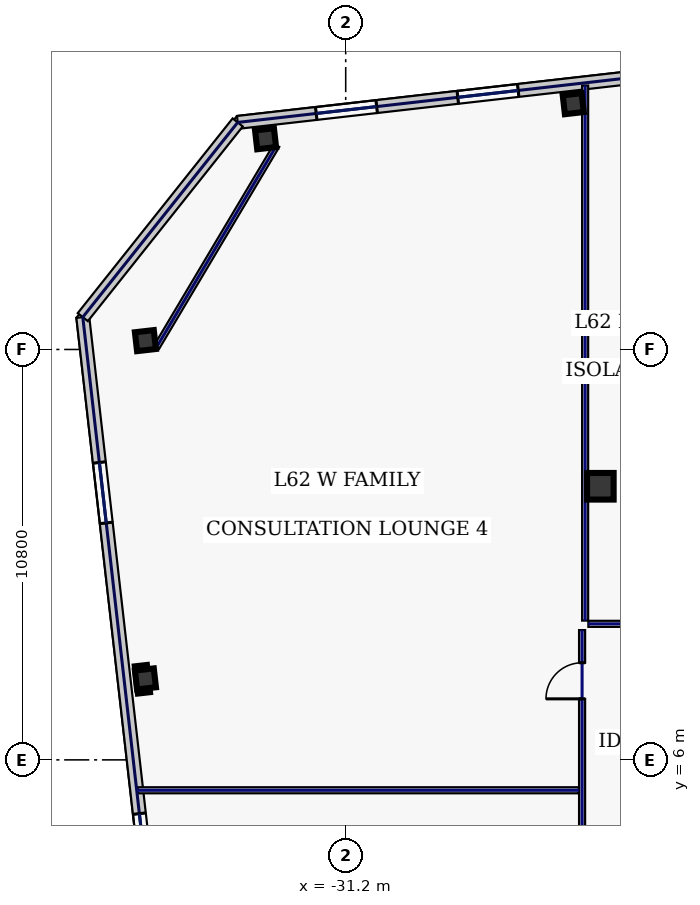
"""IFC4 building model, lengths in metres.
Left out: names, types, materials, properties, quantities, classifications, styles, units other than length and angle.
Written with IfcOpenShell. Run it as: python <this file> out.ifc"""

import sys

from ifc_helpers import new_model, si_unit, direction, frame, frame_2d, origin, origin_2d, place, context, subcontext, project, spatial, rectangle, hollow_rectangle, extrude, element, fill, save


model = new_model("IFC4")
c1 = context("Model", 3, precision=1e-05, world=origin(), true_north=direction((0.0, 1.0)))
c2 = subcontext(c1, "Body", "Model", "MODEL_VIEW")
j1 = project(units=[si_unit("LENGTHUNIT", "METRE"), si_unit("PLANEANGLEUNIT", "RADIAN")], contexts=[c1])
p1 = place(None, origin())
s1 = spatial("IfcSite", under=j1, at=p1, CompositionType="ELEMENT")
p2 = place(p1, origin())
s2 = spatial("IfcBuilding", under=s1, at=p2, CompositionType="ELEMENT")
p3 = place(p2, frame((0.0, 0.0, 267.0)))
s3 = spatial("IfcBuildingStorey", under=s2, at=p3, CompositionType="ELEMENT", Elevation=267.0)
p4 = place(p3, frame((-24.5, 13.2, 0.0), z_axis=(0.0, 0.0, 1.0), x_axis=(1.0, 0.0, 0.0)))
e1 = element("IfcColumn", 1, at=p4, inside=s3, PredefinedType="COLUMN", context=c2, shape_type="SweptSolid", body=[
    extrude(hollow_rectangle(XDim=0.7, YDim=0.7, WallThickness=0.032, at=origin_2d()), origin(), (0.0, 0.0, 1.0), 3.68),
])
for number, where, z_axis, x_axis in (
    (2, (-25.212, 23.268, 0.0), (0.0, 0.0, 1.0), (0.994, 0.113, 0.0)),
    (3, (-33.309, 22.345, 0.0), (0.0, 0.0, 1.0), (0.994, 0.113, 0.0)),
    (4, (-36.47, 17.033, 0.0), (0.0, 0.0, 1.0), (0.994, 0.113, 0.0)),
    (5, (-36.47, 8.131, 0.0), (0.0, 0.0, 1.0), (0.994, 0.113, 0.0)),
):
    element("IfcColumn", number, at=place(p3, frame(where, z_axis=z_axis, x_axis=x_axis)), inside=s3, PredefinedType="COLUMN", context=c2, shape_type="SweptSolid", body=[
        extrude(hollow_rectangle(XDim=0.5, YDim=0.5, WallThickness=0.025, at=origin_2d()), origin(), (0.0, 0.0, 1.0), 3.68),
    ])
p5 = place(p3, frame((-15.51, 24.886, 0.0), z_axis=(0.0, 0.0, 1.0), x_axis=(-0.993572271362, -0.113199565282, 0.0)))
e6 = element("IfcWall", 6, at=p5, inside=s3, PredefinedType="STANDARD", context=c2, shape_type="SweptSolid", body=[
    extrude(rectangle(XDim=18.651, YDim=0.34, at=frame_2d((9.326, 0.0))), origin(), (0.0, 0.0, 1.0), 3.68),
])
p6 = place(p5, frame((14.971, 0.0, 0.22)))
e7 = element("IfcOpeningElement", 7, at=p6, cuts=e6, PredefinedType="OPENING", context=c2, shape_type="SweptSolid", body=[
    extrude(rectangle(XDim=1.6, YDim=1.2, at=frame_2d((0.8, 0.6))), frame((0.0, 0.18, 0.0), z_axis=(0.0, -1.0, 0.0), x_axis=(1.0, 0.0, 0.0)), (0.0, 0.0, 1.0), 0.36),
])
p7 = place(p5, frame((11.223, 0.0, 0.22)))
e8 = element("IfcOpeningElement", 8, at=p7, cuts=e6, PredefinedType="OPENING", context=c2, shape_type="SweptSolid", body=[
    extrude(rectangle(XDim=1.6, YDim=1.2, at=frame_2d((0.8, 0.6))), frame((0.0, 0.18, 0.0), z_axis=(0.0, -1.0, 0.0), x_axis=(1.0, 0.0, 0.0)), (0.0, 0.0, 1.0), 0.36),
])
p8 = place(p5, frame((6.823, 0.0, 0.22)))
e9 = element("IfcOpeningElement", 9, at=p8, cuts=e6, PredefinedType="OPENING", context=c2, shape_type="SweptSolid", body=[
    extrude(rectangle(XDim=1.6, YDim=1.2, at=frame_2d((0.8, 0.6))), frame((0.0, 0.18, 0.0), z_axis=(0.0, -1.0, 0.0), x_axis=(1.0, 0.0, 0.0)), (0.0, 0.0, 1.0), 0.36),
])
p9 = place(p3, frame((-38.118, 17.651, 0.0), z_axis=(0.0, 0.0, 1.0), x_axis=(0.11320360501, -0.9935718111, 0.0)))
e10 = element("IfcWall", 10, at=p9, inside=s3, PredefinedType="STANDARD", context=c2, shape_type="SweptSolid", body=[
    extrude(rectangle(XDim=37.2, YDim=0.34, at=frame_2d((18.6, 0.0))), origin(), (0.0, 0.0, 1.0), 3.68),
])
p10 = place(p9, frame((3.85, 0.0, 0.22)))
e11 = element("IfcOpeningElement", 11, at=p10, cuts=e10, PredefinedType="OPENING", context=c2, shape_type="SweptSolid", body=[
    extrude(rectangle(XDim=1.6, YDim=1.2, at=frame_2d((0.8, 0.6))), frame((0.0, 0.18, 0.0), z_axis=(0.0, -1.0, 0.0), x_axis=(1.0, 0.0, 0.0)), (0.0, 0.0, 1.0), 0.36),
])
p11 = place(p9, frame((13.15, 0.0, 0.22)))
e12 = element("IfcOpeningElement", 12, at=p11, cuts=e10, PredefinedType="OPENING", context=c2, shape_type="SweptSolid", body=[
    extrude(rectangle(XDim=1.6, YDim=1.2, at=frame_2d((0.8, 0.6))), frame((0.0, 0.18, 0.0), z_axis=(0.0, -1.0, 0.0), x_axis=(1.0, 0.0, 0.0)), (0.0, 0.0, 1.0), 0.36),
])
p12 = place(p9, frame((31.75, 0.0, 0.22)))
e13 = element("IfcOpeningElement", 13, at=p12, cuts=e10, PredefinedType="OPENING", context=c2, shape_type="SweptSolid", body=[
    extrude(rectangle(XDim=1.6, YDim=1.2, at=frame_2d((0.8, 0.6))), frame((0.0, 0.18, 0.0), z_axis=(0.0, -1.0, 0.0), x_axis=(1.0, 0.0, 0.0)), (0.0, 0.0, 1.0), 0.36),
])
p13 = place(p3, frame((-34.042, 22.775, 0.0), z_axis=(0.0, 0.0, 1.0), x_axis=(-0.62252823689, -0.78259733853, 0.0)))
e14 = element("IfcWall", 14, at=p13, inside=s3, PredefinedType="STANDARD", context=c2, shape_type="SweptSolid", body=[
    extrude(rectangle(XDim=6.548, YDim=0.34, at=frame_2d((3.274, 0.0))), origin(), (0.0, 0.0, 1.0), 3.68),
])
p14 = place(p3, frame((-33.016, 22.171, 0.0), z_axis=(0.0, 0.0, 1.0), x_axis=(-0.511385266265, -0.859351563359, 0.0)))
e15 = element("IfcWall", 15, at=p14, inside=s3, PredefinedType="PARTITIONING", context=c2, shape_type="SweptSolid", body=[
    extrude(rectangle(XDim=6.182, YDim=0.16, at=frame_2d((3.091, 0.0))), origin(), (0.0, 0.0, 1.0), 1.475),
])
p15 = place(p3, frame((-24.98, -9.215, 0.0), z_axis=(0.0, 0.0, 1.0), x_axis=(0.0, 1.0, 0.0)))
e16 = element("IfcWall", 16, at=p15, inside=s3, PredefinedType="PARTITIONING", context=c2, shape_type="SweptSolid", body=[
    extrude(rectangle(XDim=18.63, YDim=0.16, at=frame_2d((9.315, 0.0))), origin(), (0.0, 0.0, 1.0), 3.68),
])
p16 = place(p15, frame((1.769, 0.0, 0.0)))
e17 = element("IfcOpeningElement", 17, at=p16, cuts=e16, PredefinedType="OPENING", context=c2, shape_type="SweptSolid", body=[
    extrude(rectangle(XDim=0.95, YDim=2.2, at=frame_2d((0.475, 1.1))), frame((0.0, 0.09, 0.0), z_axis=(0.0, -1.0, 0.0), x_axis=(1.0, 0.0, 0.0)), (0.0, 0.0, 1.0), 0.18),
])
p17 = place(p15, frame((6.85, 0.0, 0.0)))
e18 = element("IfcOpeningElement", 18, at=p17, cuts=e16, PredefinedType="OPENING", context=c2, shape_type="SweptSolid", body=[
    extrude(rectangle(XDim=0.95, YDim=2.2, at=frame_2d((0.475, 1.1))), frame((0.0, 0.09, 0.0), z_axis=(0.0, -1.0, 0.0), x_axis=(1.0, 0.0, 0.0)), (0.0, 0.0, 1.0), 0.18),
])
p18 = place(p15, frame((12.05, 0.0, 0.0)))
e19 = element("IfcOpeningElement", 19, at=p18, cuts=e16, PredefinedType="OPENING", context=c2, shape_type="SweptSolid", body=[
    extrude(rectangle(XDim=0.95, YDim=2.2, at=frame_2d((0.475, 1.1))), frame((0.0, 0.09, 0.0), z_axis=(0.0, -1.0, 0.0), x_axis=(1.0, 0.0, 0.0)), (0.0, 0.0, 1.0), 0.18),
])
p19 = place(p15, frame((16.821, 0.0, 0.0)))
e20 = element("IfcOpeningElement", 20, at=p19, cuts=e16, PredefinedType="OPENING", context=c2, shape_type="SweptSolid", body=[
    extrude(rectangle(XDim=0.95, YDim=2.2, at=frame_2d((0.475, 1.1))), frame((0.0, 0.09, 0.0), z_axis=(0.0, -1.0, 0.0), x_axis=(1.0, 0.0, 0.0)), (0.0, 0.0, 1.0), 0.18),
])
p20 = place(p3, frame((-24.815, 9.58, 0.0), z_axis=(0.0, 0.0, 1.0), x_axis=(1.0, 0.0, 0.0)))
e21 = element("IfcWall", 21, at=p20, inside=s3, PredefinedType="PARTITIONING", context=c2, shape_type="SweptSolid", body=[
    extrude(rectangle(XDim=49.63, YDim=0.16, at=frame_2d((24.815, 0.0))), origin(), (0.0, 0.0, 1.0), 3.68),
])
p21 = place(p20, frame((1.509, 0.0, 0.0)))
e22 = element("IfcOpeningElement", 22, at=p21, cuts=e21, PredefinedType="OPENING", context=c2, shape_type="SweptSolid", body=[
    extrude(rectangle(XDim=1.3, YDim=2.2, at=frame_2d((0.65, 1.1))), frame((0.0, 0.09, 0.0), z_axis=(0.0, -1.0, 0.0), x_axis=(1.0, 0.0, 0.0)), (0.0, 0.0, 1.0), 0.18),
])
p22 = place(p20, frame((7.045, 0.0, 0.0)))
e23 = element("IfcOpeningElement", 23, at=p22, cuts=e21, PredefinedType="OPENING", context=c2, shape_type="SweptSolid", body=[
    extrude(rectangle(XDim=1.3, YDim=2.2, at=frame_2d((0.65, 1.1))), frame((0.0, 0.09, 0.0), z_axis=(0.0, -1.0, 0.0), x_axis=(1.0, 0.0, 0.0)), (0.0, 0.0, 1.0), 0.18),
])
p23 = place(p20, frame((12.325, 0.0, 0.0)))
e24 = element("IfcOpeningElement", 24, at=p23, cuts=e21, PredefinedType="OPENING", context=c2, shape_type="SweptSolid", body=[
    extrude(rectangle(XDim=1.05, YDim=2.2, at=frame_2d((0.525, 1.1))), frame((0.0, 0.09, 0.0), z_axis=(0.0, -1.0, 0.0), x_axis=(1.0, 0.0, 0.0)), (0.0, 0.0, 1.0), 0.18),
])
p24 = place(p20, frame((21.51, 0.0, 0.0)))
e25 = element("IfcOpeningElement", 25, at=p24, cuts=e21, PredefinedType="OPENING", context=c2, shape_type="SweptSolid", body=[
    extrude(rectangle(XDim=1.3, YDim=2.2, at=frame_2d((0.65, 1.1))), frame((0.0, 0.09, 0.0), z_axis=(0.0, -1.0, 0.0), x_axis=(1.0, 0.0, 0.0)), (0.0, 0.0, 1.0), 0.18),
])
p25 = place(p20, frame((27.065, 0.0, 0.0)))
e26 = element("IfcOpeningElement", 26, at=p25, cuts=e21, PredefinedType="OPENING", context=c2, shape_type="SweptSolid", body=[
    extrude(rectangle(XDim=1.15, YDim=2.2, at=frame_2d((0.575, 1.1))), frame((0.0, 0.09, 0.0), z_axis=(0.0, -1.0, 0.0), x_axis=(1.0, 0.0, 0.0)), (0.0, 0.0, 1.0), 0.18),
])
p26 = place(p20, frame((32.2, 0.0, 0.0)))
e27 = element("IfcOpeningElement", 27, at=p26, cuts=e21, PredefinedType="OPENING", context=c2, shape_type="SweptSolid", body=[
    extrude(rectangle(XDim=1.45, YDim=2.2, at=frame_2d((0.725, 1.1))), frame((0.0, 0.09, 0.0), z_axis=(0.0, -1.0, 0.0), x_axis=(1.0, 0.0, 0.0)), (0.0, 0.0, 1.0), 0.18),
])
p27 = place(p20, frame((37.14, 0.0, 0.0)))
e28 = element("IfcOpeningElement", 28, at=p27, cuts=e21, PredefinedType="OPENING", context=c2, shape_type="SweptSolid", body=[
    extrude(rectangle(XDim=0.95, YDim=2.2, at=frame_2d((0.475, 1.1))), frame((0.0, 0.09, 0.0), z_axis=(0.0, -1.0, 0.0), x_axis=(1.0, 0.0, 0.0)), (0.0, 0.0, 1.0), 0.18),
])
p28 = place(p20, frame((41.39, 0.0, 0.0)))
e29 = element("IfcOpeningElement", 29, at=p28, cuts=e21, PredefinedType="OPENING", context=c2, shape_type="SweptSolid", body=[
    extrude(rectangle(XDim=1.05, YDim=2.2, at=frame_2d((0.525, 1.1))), frame((0.0, 0.09, 0.0), z_axis=(0.0, -1.0, 0.0), x_axis=(1.0, 0.0, 0.0)), (0.0, 0.0, 1.0), 0.18),
])
p29 = place(p20, frame((45.881, 0.0, 0.0)))
e30 = element("IfcOpeningElement", 30, at=p29, cuts=e21, PredefinedType="OPENING", context=c2, shape_type="SweptSolid", body=[
    extrude(rectangle(XDim=0.95, YDim=2.2, at=frame_2d((0.475, 1.1))), frame((0.0, 0.09, 0.0), z_axis=(0.0, -1.0, 0.0), x_axis=(1.0, 0.0, 0.0)), (0.0, 0.0, 1.0), 0.18),
])
p30 = place(p3, frame((-24.9, 9.665, 0.0), z_axis=(0.0, 0.0, 1.0), x_axis=(0.0, 1.0, 0.0)))
e31 = element("IfcWall", 31, at=p30, inside=s3, PredefinedType="PARTITIONING", context=c2, shape_type="SweptSolid", body=[
    extrude(rectangle(XDim=14.081, YDim=0.16, at=frame_2d((7.041, 0.0))), origin(), (0.0, 0.0, 1.0), 3.68),
])
p31 = place(p3, frame((-36.679, 5.2, 0.0), z_axis=(0.0, 0.0, 1.0), x_axis=(1.0, 0.0, 0.0)))
e32 = element("IfcWall", 32, at=p31, inside=s3, PredefinedType="PARTITIONING", context=c2, shape_type="SweptSolid", body=[
    extrude(rectangle(XDim=11.615, YDim=0.16, at=frame_2d((5.807, 0.0))), origin(), (0.0, 0.0, 1.0), 3.68),
])
p32 = place(p6, origin())
e33 = element("IfcWindow", 33, at=p32, inside=s3, PartitioningType="SINGLE_PANEL", PredefinedType="WINDOW", context=c2, shape_type="SweptSolid", body=[
    extrude(rectangle(XDim=1.6, YDim=1.2, at=frame_2d((0.8, 0.6))), frame((0.0, 0.03, 0.0), z_axis=(0.0, -1.0, 0.0), x_axis=(1.0, 0.0, 0.0)), (0.0, 0.0, 1.0), 0.06),
])
fill(e7, e33)
p33 = place(p7, origin())
e34 = element("IfcWindow", 34, at=p33, inside=s3, PartitioningType="SINGLE_PANEL", PredefinedType="WINDOW", context=c2, shape_type="SweptSolid", body=[
    extrude(rectangle(XDim=1.6, YDim=1.2, at=frame_2d((0.8, 0.6))), frame((0.0, 0.03, 0.0), z_axis=(0.0, -1.0, 0.0), x_axis=(1.0, 0.0, 0.0)), (0.0, 0.0, 1.0), 0.06),
])
fill(e8, e34)
p34 = place(p10, origin())
e35 = element("IfcWindow", 35, at=p34, inside=s3, PartitioningType="SINGLE_PANEL", PredefinedType="WINDOW", context=c2, shape_type="SweptSolid", body=[
    extrude(rectangle(XDim=1.6, YDim=1.2, at=frame_2d((0.8, 0.6))), frame((0.0, 0.03, 0.0), z_axis=(0.0, -1.0, 0.0), x_axis=(1.0, 0.0, 0.0)), (0.0, 0.0, 1.0), 0.06),
])
fill(e11, e35)
p35 = place(p11, origin())
e36 = element("IfcWindow", 36, at=p35, inside=s3, PartitioningType="SINGLE_PANEL", PredefinedType="WINDOW", context=c2, shape_type="SweptSolid", body=[
    extrude(rectangle(XDim=1.6, YDim=1.2, at=frame_2d((0.8, 0.6))), frame((0.0, 0.03, 0.0), z_axis=(0.0, -1.0, 0.0), x_axis=(1.0, 0.0, 0.0)), (0.0, 0.0, 1.0), 0.06),
])
fill(e12, e36)
p36 = place(p19, origin())
e37 = element("IfcDoor", 37, at=p36, inside=s3, OperationType="SINGLE_SWING_LEFT", PredefinedType="DOOR", context=c2, shape_type="SweptSolid", body=[
    extrude(rectangle(XDim=0.95, YDim=2.2, at=frame_2d((0.475, 1.1))), frame((0.0, 0.025, 0.0), z_axis=(0.0, -1.0, 0.0), x_axis=(1.0, 0.0, 0.0)), (0.0, 0.0, 1.0), 0.05),
])
fill(e20, e37)
save(model, sys.argv[1])
